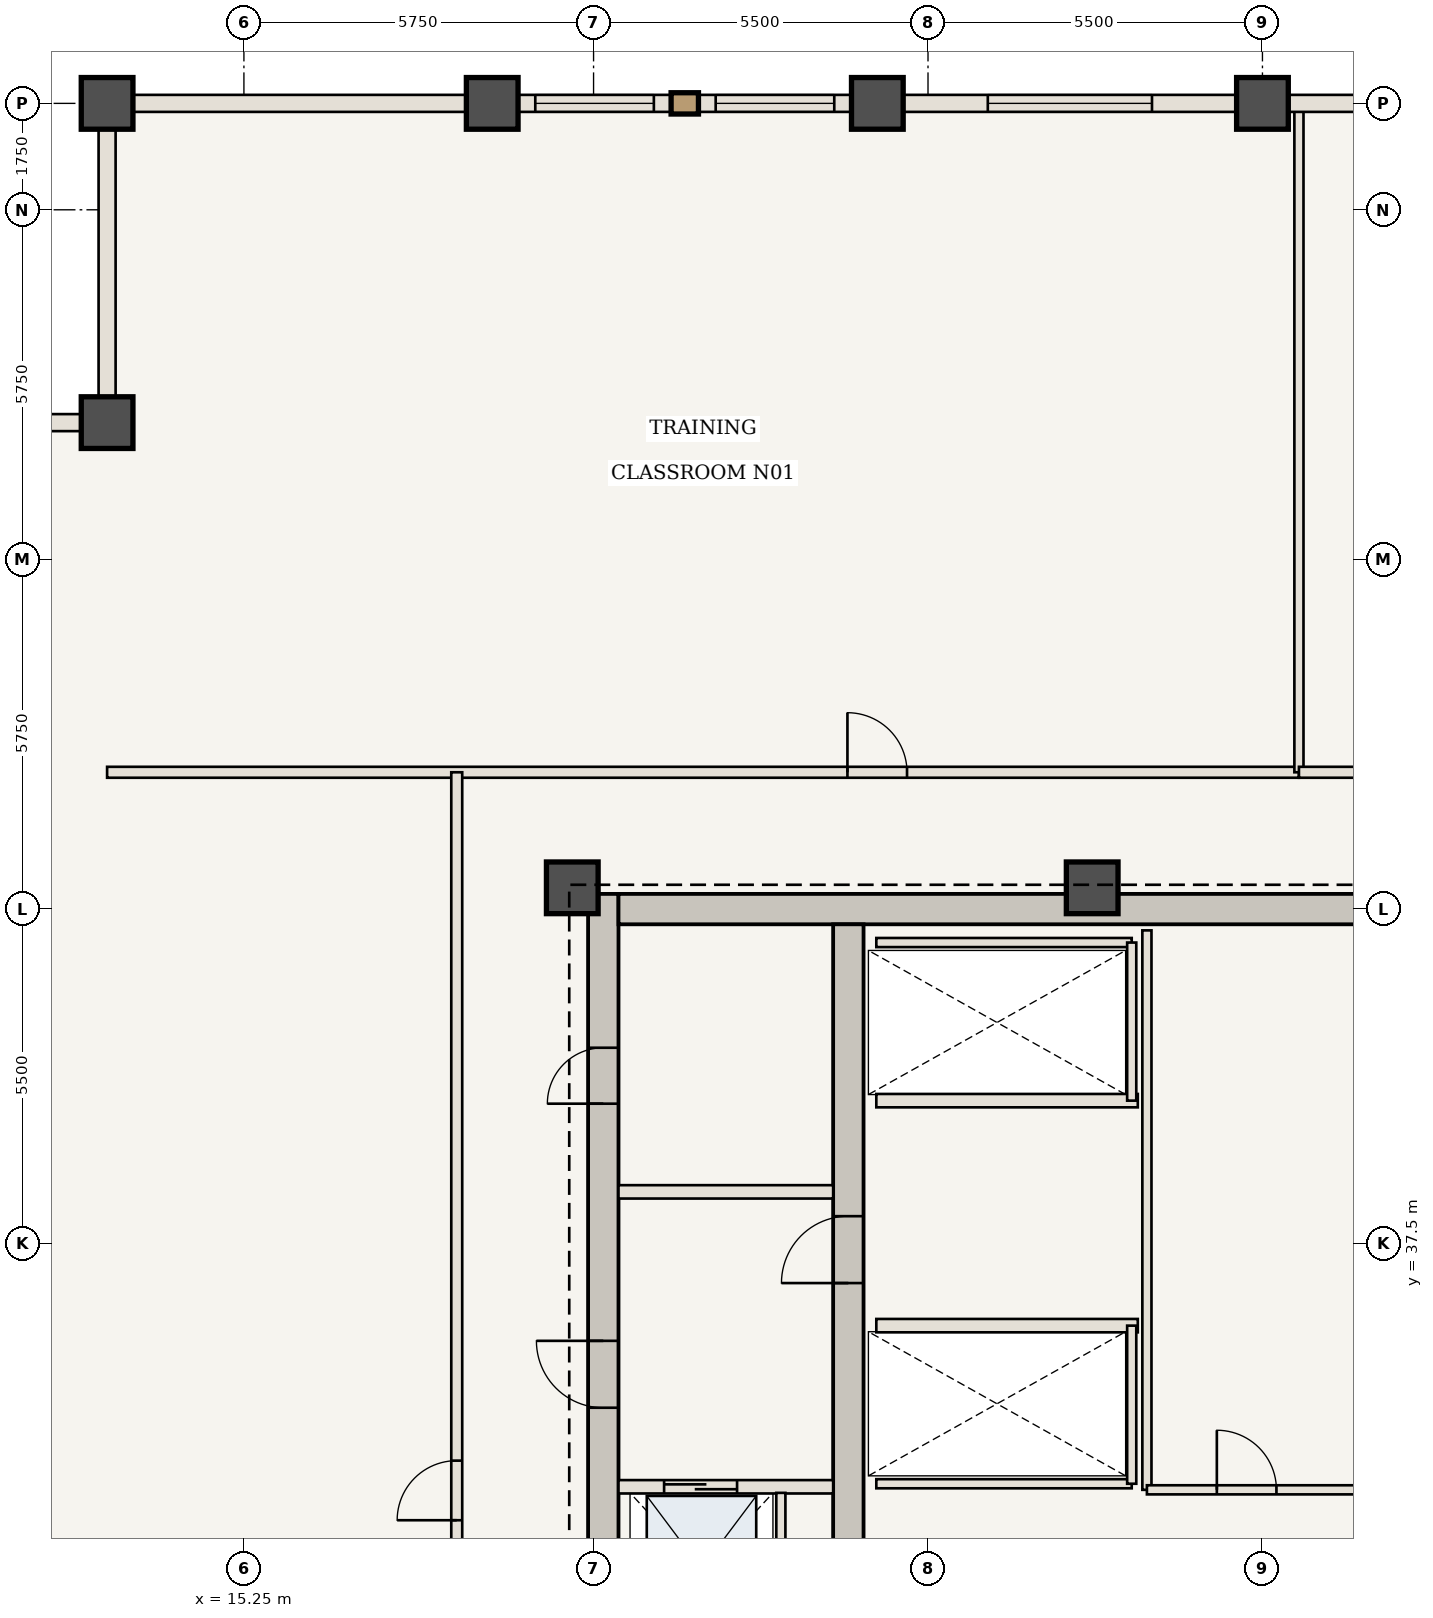
"""IFC4 building model, lengths in metres.
Left out: names, types, materials, properties, quantities, classifications, styles, units other than length and angle.
Written with IfcOpenShell. Run it as: python <this file> out.ifc"""

import sys

from ifc_helpers import new_model, si_unit, direction, frame, frame_2d, origin, origin_2d, place, context, subcontext, project, spatial, rectangle, extrude, element, fill, save


model = new_model("IFC4")
c1 = context("Model", 3, precision=1e-05, world=origin(), true_north=direction((0.0, 1.0)))
c2 = subcontext(c1, "Body", "Model", "MODEL_VIEW")
j1 = project(units=[si_unit("LENGTHUNIT", "METRE"), si_unit("PLANEANGLEUNIT", "RADIAN")], contexts=[c1])
p1 = place(None, origin())
s1 = spatial("IfcSite", under=j1, at=p1, CompositionType="ELEMENT")
p2 = place(p1, origin())
s2 = spatial("IfcBuilding", under=s1, at=p2, CompositionType="ELEMENT")
p3 = place(p2, frame((0.0, 0.0, 236.95)))
s3 = spatial("IfcBuildingStorey", under=s2, at=p3, CompositionType="ELEMENT", Elevation=236.95)
p4 = place(p3, frame((21.16, 30.6, 0.0), z_axis=(0.0, 0.0, 1.0), x_axis=(0.0, 1.0, 0.0)))
e1 = element("IfcWall", 1, at=p4, inside=s3, PredefinedType="SHEAR", context=c2, shape_type="SweptSolid", body=[
    extrude(rectangle(XDim=12.65, YDim=0.5, at=frame_2d((6.325, 0.0))), origin(), (0.0, 0.0, 1.0), 3.85),
])
p5 = place(p4, frame((4.2, 0.0, 0.0)))
e2 = element("IfcOpeningElement", 2, at=p5, cuts=e1, PredefinedType="OPENING", context=c2, shape_type="SweptSolid", body=[
    extrude(rectangle(XDim=1.1, YDim=2.15, at=frame_2d((0.55, 1.075))), frame((0.0, 0.26, 0.0), z_axis=(0.0, -1.0, 0.0), x_axis=(1.0, 0.0, 0.0)), (0.0, 0.0, 1.0), 0.52),
])
p6 = place(p4, frame((9.2, 0.0, 0.0)))
e3 = element("IfcOpeningElement", 3, at=p6, cuts=e1, PredefinedType="OPENING", context=c2, shape_type="SweptSolid", body=[
    extrude(rectangle(XDim=0.92, YDim=2.1, at=frame_2d((0.46, 1.05))), frame((0.0, 0.26, 0.0), z_axis=(0.0, -1.0, 0.0), x_axis=(1.0, 0.0, 0.0)), (0.0, 0.0, 1.0), 0.52),
])
p7 = place(p3, frame((21.41, 43.0, 0.0), z_axis=(0.0, 0.0, 1.0), x_axis=(1.0, 0.0, 0.0)))
e4 = element("IfcWall", 4, at=p7, inside=s3, PredefinedType="SHEAR", context=c2, shape_type="SweptSolid", body=[
    extrude(rectangle(XDim=12.79, YDim=0.5, at=frame_2d((6.395, 0.0))), origin(), (0.0, 0.0, 1.0), 3.85),
])
p8 = place(p3, frame((25.19, 30.6, 0.0), z_axis=(0.0, 0.0, 1.0), x_axis=(0.0, 1.0, 0.0)))
e5 = element("IfcWall", 5, at=p8, inside=s3, PredefinedType="SHEAR", context=c2, shape_type="SweptSolid", body=[
    extrude(rectangle(XDim=12.15, YDim=0.5, at=frame_2d((6.075, 0.0))), origin(), (0.0, 0.0, 1.0), 3.85),
])
p9 = place(p8, frame((6.25, 0.0, 0.0)))
e6 = element("IfcOpeningElement", 6, at=p9, cuts=e5, PredefinedType="OPENING", context=c2, shape_type="SweptSolid", body=[
    extrude(rectangle(XDim=1.1, YDim=2.15, at=frame_2d((0.55, 1.075))), frame((0.0, 0.26, 0.0), z_axis=(0.0, -1.0, 0.0), x_axis=(1.0, 0.0, 0.0)), (0.0, 0.0, 1.0), 0.52),
])
for number, where, z_axis, x_axis in (
    (7, (29.2, 43.35, 0.0), (0.0, 0.0, 1.0), (1.0, 0.0, 0.0)),
    (8, (20.65, 43.35, 0.0), (0.0, 0.0, 1.0), (1.0, 0.0, 0.0)),
    (9, (13.0, 56.25, 0.0), (0.0, 0.0, 1.0), (1.0, 0.0, 0.0)),
    (10, (13.0, 51.0, 0.0), (0.0, 0.0, 1.0), (1.0, 0.0, 0.0)),
    (11, (19.333, 56.25, 0.0), (0.0, 0.0, 1.0), (1.0, 0.0, 0.0)),
    (12, (25.667, 56.25, 0.0), (0.0, 0.0, 1.0), (1.0, 0.0, 0.0)),
    (13, (32.0, 56.25, 0.0), (0.0, 0.0, 1.0), (1.0, 0.0, 0.0)),
):
    element("IfcColumn", number, at=place(p3, frame(where, z_axis=z_axis, x_axis=x_axis)), inside=s3, PredefinedType="COLUMN", context=c2, shape_type="SweptSolid", body=[
        extrude(rectangle(XDim=0.85, YDim=0.85, at=origin_2d()), origin(), (0.0, 0.0, 1.0), 3.85),
    ])
p10 = place(p3, frame((21.41, 33.5, 0.0), z_axis=(0.0, 0.0, 1.0), x_axis=(1.0, 0.0, 0.0)))
e14 = element("IfcWall", 14, at=p10, inside=s3, PredefinedType="STANDARD", context=c2, shape_type="SweptSolid", body=[
    extrude(rectangle(XDim=3.53, YDim=0.22, at=frame_2d((1.765, 0.0))), origin(), (0.0, 0.0, 1.0), 3.685),
])
p11 = place(p10, frame((0.75, 0.0, 0.0)))
e15 = element("IfcOpeningElement", 15, at=p11, cuts=e14, PredefinedType="OPENING", context=c2, shape_type="SweptSolid", body=[
    extrude(rectangle(XDim=1.2, YDim=2.2, at=frame_2d((0.6, 1.1))), frame((0.0, 0.12, 0.0), z_axis=(0.0, -1.0, 0.0), x_axis=(1.0, 0.0, 0.0)), (0.0, 0.0, 1.0), 0.24),
])
p12 = place(p3, frame((24.08, 30.75, 0.0), z_axis=(0.0, 0.0, 1.0), x_axis=(0.0, 1.0, 0.0)))
e16 = element("IfcWall", 16, at=p12, inside=s3, PredefinedType="STANDARD", context=c2, shape_type="SweptSolid", body=[
    extrude(rectangle(XDim=2.65, YDim=0.15, at=frame_2d((1.325, 0.0))), origin(), (0.0, 0.0, 1.0), 3.685),
])
p13 = place(p3, frame((21.41, 38.35, 0.0), z_axis=(0.0, 0.0, 1.0), x_axis=(1.0, 0.0, 0.0)))
e17 = element("IfcWall", 17, at=p13, inside=s3, PredefinedType="STANDARD", context=c2, shape_type="SweptSolid", body=[
    extrude(rectangle(XDim=3.53, YDim=0.22, at=frame_2d((1.765, 0.0))), origin(), (0.0, 0.0, 1.0), 3.685),
])
p14 = place(p3, frame((25.65, 36.15, 0.0), z_axis=(0.0, 0.0, 1.0), x_axis=(1.0, 0.0, 0.0)))
e18 = element("IfcWall", 18, at=p14, inside=s3, PredefinedType="STANDARD", context=c2, shape_type="SweptSolid", body=[
    extrude(rectangle(XDim=4.3, YDim=0.22, at=frame_2d((2.15, 0.0))), origin(), (0.0, 0.0, 1.0), 3.685),
])
p15 = place(p3, frame((25.65, 33.55, 0.0), z_axis=(0.0, 0.0, 1.0), x_axis=(1.0, 0.0, 0.0)))
e19 = element("IfcWall", 19, at=p15, inside=s3, PredefinedType="STANDARD", context=c2, shape_type="SweptSolid", body=[
    extrude(rectangle(XDim=4.2, YDim=0.15, at=frame_2d((2.1, 0.0))), origin(), (0.0, 0.0, 1.0), 3.685),
])
p16 = place(p3, frame((29.85, 33.55, 0.0), z_axis=(0.0, 0.0, 1.0), x_axis=(0.0, 1.0, 0.0)))
e20 = element("IfcWall", 20, at=p16, inside=s3, PredefinedType="STANDARD", context=c2, shape_type="SweptSolid", body=[
    extrude(rectangle(XDim=2.6, YDim=0.15, at=frame_2d((1.3, 0.0))), origin(), (0.0, 0.0, 1.0), 3.685),
])
p17 = place(p3, frame((25.65, 39.85, 0.0), z_axis=(0.0, 0.0, 1.0), x_axis=(1.0, 0.0, 0.0)))
e21 = element("IfcWall", 21, at=p17, inside=s3, PredefinedType="STANDARD", context=c2, shape_type="SweptSolid", body=[
    extrude(rectangle(XDim=4.3, YDim=0.22, at=frame_2d((2.15, 0.0))), origin(), (0.0, 0.0, 1.0), 3.685),
])
p18 = place(p3, frame((25.65, 42.45, 0.0), z_axis=(0.0, 0.0, 1.0), x_axis=(1.0, 0.0, 0.0)))
e22 = element("IfcWall", 22, at=p18, inside=s3, PredefinedType="STANDARD", context=c2, shape_type="SweptSolid", body=[
    extrude(rectangle(XDim=4.2, YDim=0.15, at=frame_2d((2.1, 0.0))), origin(), (0.0, 0.0, 1.0), 3.685),
])
p19 = place(p3, frame((29.85, 39.85, 0.0), z_axis=(0.0, 0.0, 1.0), x_axis=(0.0, 1.0, 0.0)))
e23 = element("IfcWall", 23, at=p19, inside=s3, PredefinedType="STANDARD", context=c2, shape_type="SweptSolid", body=[
    extrude(rectangle(XDim=2.6, YDim=0.15, at=frame_2d((1.3, 0.0))), origin(), (0.0, 0.0, 1.0), 3.685),
])
p20 = place(p3, frame((30.1, 33.45, 0.0), z_axis=(0.0, 0.0, 1.0), x_axis=(0.0, 1.0, 0.0)))
e24 = element("IfcWall", 24, at=p20, inside=s3, PredefinedType="STANDARD", context=c2, shape_type="SweptSolid", body=[
    extrude(rectangle(XDim=9.2, YDim=0.15, at=frame_2d((4.6, 0.0))), origin(), (0.0, 0.0, 1.0), 3.685),
])
p21 = place(p3, frame((30.1, 33.45, 0.0), z_axis=(0.0, 0.0, 1.0), x_axis=(1.0, 0.0, 0.0)))
e25 = element("IfcWall", 25, at=p21, inside=s3, PredefinedType="STANDARD", context=c2, shape_type="SweptSolid", body=[
    extrude(rectangle(XDim=3.75, YDim=0.15, at=frame_2d((1.875, 0.0))), origin(), (0.0, 0.0, 1.0), 3.685),
])
p22 = place(p21, frame((1.15, 0.0, 0.0)))
e26 = element("IfcOpeningElement", 26, at=p22, cuts=e25, PredefinedType="OPENING", context=c2, shape_type="SweptSolid", body=[
    extrude(rectangle(XDim=0.98, YDim=2.2, at=frame_2d((0.49, 1.1))), frame((0.0, 0.085, 0.0), z_axis=(0.0, -1.0, 0.0), x_axis=(1.0, 0.0, 0.0)), (0.0, 0.0, 1.0), 0.17),
])
p23 = place(p3, frame((13.0, 45.25, 0.0), z_axis=(0.0, 0.0, 1.0), x_axis=(1.0, 0.0, 0.0)))
e27 = element("IfcWall", 27, at=p23, inside=s3, PredefinedType="STANDARD", context=c2, shape_type="SweptSolid", body=[
    extrude(rectangle(XDim=19.6, YDim=0.18, at=frame_2d((9.8, 0.0))), origin(), (0.0, 0.0, 1.0), 3.685),
])
p24 = place(p23, frame((12.175, 0.0, 0.0)))
e28 = element("IfcOpeningElement", 28, at=p24, cuts=e27, PredefinedType="OPENING", context=c2, shape_type="SweptSolid", body=[
    extrude(rectangle(XDim=0.98, YDim=2.2, at=frame_2d((0.49, 1.1))), frame((0.0, 0.1, 0.0), z_axis=(0.0, -1.0, 0.0), x_axis=(1.0, 0.0, 0.0)), (0.0, 0.0, 1.0), 0.2),
])
p25 = place(p3, frame((32.6, 45.25, 0.0), z_axis=(0.0, 0.0, 1.0), x_axis=(0.0, 1.0, 0.0)))
e29 = element("IfcWall", 29, at=p25, inside=s3, PredefinedType="STANDARD", context=c2, shape_type="SweptSolid", body=[
    extrude(rectangle(XDim=10.94, YDim=0.15, at=frame_2d((5.47, 0.0))), origin(), (0.0, 0.0, 1.0), 3.685),
])
p26 = place(p3, frame((32.6, 45.25, 0.0), z_axis=(0.0, 0.0, 1.0), x_axis=(1.0, 0.0, 0.0)))
e30 = element("IfcWall", 30, at=p26, inside=s3, PredefinedType="STANDARD", context=c2, shape_type="SweptSolid", body=[
    extrude(rectangle(XDim=18.4, YDim=0.18, at=frame_2d((9.2, 0.0))), origin(), (0.0, 0.0, 1.0), 3.685),
])
p27 = place(p26, frame((5.975, 0.0, 0.0)))
e31 = element("IfcOpeningElement", 31, at=p27, cuts=e30, PredefinedType="OPENING", context=c2, shape_type="SweptSolid", body=[
    extrude(rectangle(XDim=0.98, YDim=2.2, at=frame_2d((0.49, 1.1))), frame((0.0, 0.1, 0.0), z_axis=(0.0, -1.0, 0.0), x_axis=(1.0, 0.0, 0.0)), (0.0, 0.0, 1.0), 0.2),
])
p28 = place(p3, frame((18.75, 18.75, 0.0), z_axis=(0.0, 0.0, 1.0), x_axis=(0.0, 1.0, 0.0)))
e32 = element("IfcWall", 32, at=p28, inside=s3, PredefinedType="STANDARD", context=c2, shape_type="SweptSolid", body=[
    extrude(rectangle(XDim=26.5, YDim=0.18, at=frame_2d((13.25, 0.0))), origin(), (0.0, 0.0, 1.0), 3.685),
])
p29 = place(p28, frame((14.2, 0.0, 0.0)))
e33 = element("IfcOpeningElement", 33, at=p29, cuts=e32, PredefinedType="OPENING", context=c2, shape_type="SweptSolid", body=[
    extrude(rectangle(XDim=0.98, YDim=2.2, at=frame_2d((0.49, 1.1))), frame((0.0, 0.1, 0.0), z_axis=(0.0, -1.0, 0.0), x_axis=(1.0, 0.0, 0.0)), (0.0, 0.0, 1.0), 0.2),
])
p30 = place(p3, frame((13.0, 56.25, 0.0), z_axis=(0.0, 0.0, 1.0), x_axis=(1.0, 0.0, 0.0)))
e34 = element("IfcWall", 34, at=p30, inside=s3, PredefinedType="USERDEFINED", context=c2, shape_type="SweptSolid", body=[
    extrude(rectangle(XDim=6.333, YDim=0.28, at=frame_2d((3.167, 0.0))), origin(), (0.0, 0.0, 1.0), 2.985),
])
p31 = place(p3, frame((19.333, 56.25, 0.0), z_axis=(0.0, 0.0, 1.0), x_axis=(1.0, 0.0, 0.0)))
e35 = element("IfcWall", 35, at=p31, inside=s3, PredefinedType="USERDEFINED", context=c2, shape_type="SweptSolid", body=[
    extrude(rectangle(XDim=6.333, YDim=0.28, at=frame_2d((3.167, 0.0))), origin(), (0.0, 0.0, 1.0), 2.985),
])
p32 = place(p31, frame((0.708, 0.0, 0.85)))
e36 = element("IfcOpeningElement", 36, at=p32, cuts=e35, PredefinedType="OPENING", context=c2, shape_type="SweptSolid", body=[
    extrude(rectangle(XDim=1.95, YDim=1.935, at=frame_2d((0.975, 0.968))), frame((0.0, 0.15, 0.0), z_axis=(0.0, -1.0, 0.0), x_axis=(1.0, 0.0, 0.0)), (0.0, 0.0, 1.0), 0.3),
])
p33 = place(p31, frame((3.675, 0.0, 0.85)))
e37 = element("IfcOpeningElement", 37, at=p33, cuts=e35, PredefinedType="OPENING", context=c2, shape_type="SweptSolid", body=[
    extrude(rectangle(XDim=1.95, YDim=1.935, at=frame_2d((0.975, 0.968))), frame((0.0, 0.15, 0.0), z_axis=(0.0, -1.0, 0.0), x_axis=(1.0, 0.0, 0.0)), (0.0, 0.0, 1.0), 0.3),
])
p34 = place(p3, frame((25.667, 56.25, 0.0), z_axis=(0.0, 0.0, 1.0), x_axis=(1.0, 0.0, 0.0)))
e38 = element("IfcWall", 38, at=p34, inside=s3, PredefinedType="USERDEFINED", context=c2, shape_type="SweptSolid", body=[
    extrude(rectangle(XDim=6.333, YDim=0.28, at=frame_2d((3.167, 0.0))), origin(), (0.0, 0.0, 1.0), 2.985),
])
p35 = place(p34, frame((1.817, 0.0, 0.85)))
e39 = element("IfcOpeningElement", 39, at=p35, cuts=e38, PredefinedType="OPENING", context=c2, shape_type="SweptSolid", body=[
    extrude(rectangle(XDim=2.7, YDim=1.935, at=frame_2d((1.35, 0.968))), frame((0.0, 0.15, 0.0), z_axis=(0.0, -1.0, 0.0), x_axis=(1.0, 0.0, 0.0)), (0.0, 0.0, 1.0), 0.3),
])
p36 = place(p3, frame((32.0, 56.25, 0.0), z_axis=(0.0, 0.0, 1.0), x_axis=(1.0, 0.0, 0.0)))
e40 = element("IfcWall", 40, at=p36, inside=s3, PredefinedType="USERDEFINED", context=c2, shape_type="SweptSolid", body=[
    extrude(rectangle(XDim=6.333, YDim=0.28, at=frame_2d((3.167, 0.0))), origin(), (0.0, 0.0, 1.0), 2.985),
])
p37 = place(p36, frame((1.954, 0.0, 0.85)))
e41 = element("IfcOpeningElement", 41, at=p37, cuts=e40, PredefinedType="OPENING", context=c2, shape_type="SweptSolid", body=[
    extrude(rectangle(XDim=2.7, YDim=1.935, at=frame_2d((1.35, 0.968))), frame((0.0, 0.15, 0.0), z_axis=(0.0, -1.0, 0.0), x_axis=(1.0, 0.0, 0.0)), (0.0, 0.0, 1.0), 0.3),
])
for number, where, z_axis, x_axis in (
    (42, (13.0, 51.0, 0.0), (0.0, 0.0, 1.0), (0.0, 1.0, 0.0)),
    (43, (7.75, 51.0, 0.0), (0.0, 0.0, 1.0), (1.0, 0.0, 0.0)),
):
    element("IfcWall", number, at=place(p3, frame(where, z_axis=z_axis, x_axis=x_axis)), inside=s3, PredefinedType="USERDEFINED", context=c2, shape_type="SweptSolid", body=[
        extrude(rectangle(XDim=5.25, YDim=0.28, at=frame_2d((2.625, 0.0))), origin(), (0.0, 0.0, 1.0), 2.985),
    ])
p38 = place(p5, origin())
e44 = element("IfcDoor", 44, at=p38, inside=s3, OperationType="SINGLE_SWING_RIGHT", PredefinedType="DOOR", context=c2, shape_type="SweptSolid", body=[
    extrude(rectangle(XDim=1.1, YDim=2.15, at=frame_2d((0.55, 1.075))), frame((0.0, 0.025, 0.0), z_axis=(0.0, -1.0, 0.0), x_axis=(1.0, 0.0, 0.0)), (0.0, 0.0, 1.0), 0.05),
])
fill(e2, e44)
p39 = place(p9, origin())
e45 = element("IfcDoor", 45, at=p39, inside=s3, OperationType="SINGLE_SWING_LEFT", PredefinedType="DOOR", context=c2, shape_type="SweptSolid", body=[
    extrude(rectangle(XDim=1.1, YDim=2.15, at=frame_2d((0.55, 1.075))), frame((0.0, 0.025, 0.0), z_axis=(0.0, -1.0, 0.0), x_axis=(1.0, 0.0, 0.0)), (0.0, 0.0, 1.0), 0.05),
])
fill(e6, e45)
p40 = place(p6, origin())
e46 = element("IfcDoor", 46, at=p40, inside=s3, OperationType="SINGLE_SWING_LEFT", PredefinedType="DOOR", context=c2, shape_type="SweptSolid", body=[
    extrude(rectangle(XDim=0.92, YDim=2.1, at=frame_2d((0.46, 1.05))), frame((0.0, 0.025, 0.0), z_axis=(0.0, -1.0, 0.0), x_axis=(1.0, 0.0, 0.0)), (0.0, 0.0, 1.0), 0.05),
])
fill(e3, e46)
p41 = place(p11, origin())
e47 = element("IfcDoor", 47, at=p41, inside=s3, OperationType="DOUBLE_DOOR_SLIDING", PredefinedType="DOOR", context=c2, shape_type="SweptSolid", body=[
    extrude(rectangle(XDim=1.2, YDim=2.2, at=frame_2d((0.6, 1.1))), frame((0.0, 0.025, 0.0), z_axis=(0.0, -1.0, 0.0), x_axis=(1.0, 0.0, 0.0)), (0.0, 0.0, 1.0), 0.05),
])
fill(e15, e47)
p42 = place(p22, origin())
e48 = element("IfcDoor", 48, at=p42, inside=s3, OperationType="SINGLE_SWING_LEFT", PredefinedType="DOOR", context=c2, shape_type="SweptSolid", body=[
    extrude(rectangle(XDim=0.98, YDim=2.2, at=frame_2d((0.49, 1.1))), frame((0.0, 0.025, 0.0), z_axis=(0.0, -1.0, 0.0), x_axis=(1.0, 0.0, 0.0)), (0.0, 0.0, 1.0), 0.05),
])
fill(e26, e48)
p43 = place(p24, origin())
e49 = element("IfcDoor", 49, at=p43, inside=s3, OperationType="SINGLE_SWING_LEFT", PredefinedType="DOOR", context=c2, shape_type="SweptSolid", body=[
    extrude(rectangle(XDim=0.98, YDim=2.2, at=frame_2d((0.49, 1.1))), frame((0.0, 0.025, 0.0), z_axis=(0.0, -1.0, 0.0), x_axis=(1.0, 0.0, 0.0)), (0.0, 0.0, 1.0), 0.05),
])
fill(e28, e49)
p44 = place(p29, origin())
e50 = element("IfcDoor", 50, at=p44, inside=s3, OperationType="SINGLE_SWING_LEFT", PredefinedType="DOOR", context=c2, shape_type="SweptSolid", body=[
    extrude(rectangle(XDim=0.98, YDim=2.2, at=frame_2d((0.49, 1.1))), frame((0.0, 0.025, 0.0), z_axis=(0.0, -1.0, 0.0), x_axis=(1.0, 0.0, 0.0)), (0.0, 0.0, 1.0), 0.05),
])
fill(e33, e50)
p45 = place(p32, origin())
e51 = element("IfcWindow", 51, at=p45, inside=s3, PartitioningType="SINGLE_PANEL", PredefinedType="WINDOW", context=c2, shape_type="SweptSolid", body=[
    extrude(rectangle(XDim=1.95, YDim=1.935, at=frame_2d((0.975, 0.968))), frame((0.0, 0.03, 0.0), z_axis=(0.0, -1.0, 0.0), x_axis=(1.0, 0.0, 0.0)), (0.0, 0.0, 1.0), 0.06),
])
fill(e36, e51)
p46 = place(p33, origin())
e52 = element("IfcWindow", 52, at=p46, inside=s3, PartitioningType="SINGLE_PANEL", PredefinedType="WINDOW", context=c2, shape_type="SweptSolid", body=[
    extrude(rectangle(XDim=1.95, YDim=1.935, at=frame_2d((0.975, 0.968))), frame((0.0, 0.03, 0.0), z_axis=(0.0, -1.0, 0.0), x_axis=(1.0, 0.0, 0.0)), (0.0, 0.0, 1.0), 0.06),
])
fill(e37, e52)
p47 = place(p35, origin())
e53 = element("IfcWindow", 53, at=p47, inside=s3, PartitioningType="SINGLE_PANEL", PredefinedType="WINDOW", context=c2, shape_type="SweptSolid", body=[
    extrude(rectangle(XDim=2.7, YDim=1.935, at=frame_2d((1.35, 0.968))), frame((0.0, 0.03, 0.0), z_axis=(0.0, -1.0, 0.0), x_axis=(1.0, 0.0, 0.0)), (0.0, 0.0, 1.0), 0.06),
])
fill(e39, e53)
save(model, sys.argv[1])
